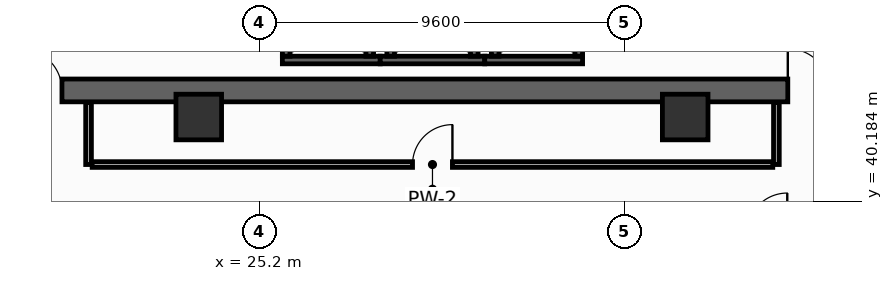
"""IFC4 building model, lengths in metres.
Left out: names, types, materials, properties, quantities, classifications, styles, units other than length and angle.
Written with IfcOpenShell. Run it as: python <this file> out.ifc"""

import sys

from ifc_helpers import new_model, si_unit, direction, frame, frame_2d, origin, origin_2d, place, context, subcontext, project, spatial, rectangle, hollow_rectangle, extrude, element, fill, save


model = new_model("IFC4")
c1 = context("Model", 3, precision=1e-05, world=origin(), true_north=direction((0.0, 1.0)))
c2 = subcontext(c1, "Body", "Model", "MODEL_VIEW")
j1 = project(units=[si_unit("LENGTHUNIT", "METRE"), si_unit("PLANEANGLEUNIT", "RADIAN")], contexts=[c1])
p1 = place(None, origin())
s1 = spatial("IfcSite", under=j1, at=p1, CompositionType="ELEMENT")
p2 = place(p1, origin())
s2 = spatial("IfcBuilding", under=s1, at=p2, CompositionType="ELEMENT")
p3 = place(p2, frame((0.0, 0.0, 60.4)))
s3 = spatial("IfcBuildingStorey", under=s2, at=p3, CompositionType="ELEMENT", Elevation=60.4)
p4 = place(p3, frame((13.5, 43.1, 0.0), z_axis=(0.0, 0.0, 1.0), x_axis=(1.0, 0.0, 0.0)))
e1 = element("IfcWall", 1, at=p4, inside=s3, PredefinedType="SHEAR", context=c2, shape_type="SweptSolid", body=[
    extrude(rectangle(XDim=32.9, YDim=0.6, at=frame_2d((16.45, 0.0))), origin(), (0.0, 0.0, 1.0), 4.15),
])
p5 = place(p4, frame((5.4, 0.0, 0.0)))
e2 = element("IfcOpeningElement", 2, at=p5, cuts=e1, PredefinedType="OPENING", context=c2, shape_type="SweptSolid", body=[
    extrude(rectangle(XDim=1.1, YDim=2.15, at=frame_2d((0.55, 1.075))), frame((0.0, 0.31, 0.0), z_axis=(0.0, -1.0, 0.0), x_axis=(1.0, 0.0, 0.0)), (0.0, 0.0, 1.0), 0.62),
])
p6 = place(p4, frame((25.6, 0.0, 0.0)))
e3 = element("IfcOpeningElement", 3, at=p6, cuts=e1, PredefinedType="OPENING", context=c2, shape_type="SweptSolid", body=[
    extrude(rectangle(XDim=1.1, YDim=2.15, at=frame_2d((0.55, 1.075))), frame((0.0, 0.31, 0.0), z_axis=(0.0, -1.0, 0.0), x_axis=(1.0, 0.0, 0.0)), (0.0, 0.0, 1.0), 0.62),
])
for number, where, z_axis, x_axis in (
    (4, (23.6, 42.4, 0.0), (0.0, 0.0, 1.0), (1.0, 0.0, 0.0)),
    (5, (36.4, 42.4, 0.0), (0.0, 0.0, 1.0), (1.0, 0.0, 0.0)),
):
    element("IfcColumn", number, at=place(p3, frame(where, z_axis=z_axis, x_axis=x_axis)), inside=s3, PredefinedType="COLUMN", context=c2, shape_type="SweptSolid", body=[
        extrude(hollow_rectangle(XDim=1.2, YDim=1.2, WallThickness=0.055, at=origin_2d()), origin(), (0.0, 0.0, 1.0), 4.4),
    ])
p7 = place(p3, frame((25.8, 43.9, 0.0), z_axis=(0.0, 0.0, 1.0), x_axis=(1.0, 0.0, 0.0)))
e6 = element("IfcWall", 6, at=p7, inside=s3, PredefinedType="SHEAR", context=c2, shape_type="SweptSolid", body=[
    extrude(rectangle(XDim=2.575, YDim=0.2, at=frame_2d((1.288, 0.0))), origin(), (0.0, 0.0, 1.0), 4.15),
])
for number, where, z_axis, x_axis in (
    (7, (25.9, 44.0, 0.0), (0.0, 0.0, 1.0), (0.0, 1.0, 0.0)),
    (8, (28.1, 44.0, 0.0), (0.0, 0.0, 1.0), (0.0, 1.0, 0.0)),
):
    element("IfcWall", number, at=place(p3, frame(where, z_axis=z_axis, x_axis=x_axis)), inside=s3, PredefinedType="SHEAR", context=c2, shape_type="SweptSolid", body=[
        extrude(rectangle(XDim=2.3, YDim=0.2, at=frame_2d((1.15, 0.0))), origin(), (0.0, 0.0, 1.0), 4.15),
    ])
p8 = place(p3, frame((28.375, 43.9, 0.0), z_axis=(0.0, 0.0, 1.0), x_axis=(1.0, 0.0, 0.0)))
e9 = element("IfcWall", 9, at=p8, inside=s3, PredefinedType="SHEAR", context=c2, shape_type="SweptSolid", body=[
    extrude(rectangle(XDim=2.75, YDim=0.2, at=frame_2d((1.375, 0.0))), origin(), (0.0, 0.0, 1.0), 4.15),
])
for number, where, z_axis, x_axis in (
    (10, (28.65, 44.0, 0.0), (0.0, 0.0, 1.0), (0.0, 1.0, 0.0)),
    (11, (30.85, 44.0, 0.0), (0.0, 0.0, 1.0), (0.0, 1.0, 0.0)),
):
    element("IfcWall", number, at=place(p3, frame(where, z_axis=z_axis, x_axis=x_axis)), inside=s3, PredefinedType="SHEAR", context=c2, shape_type="SweptSolid", body=[
        extrude(rectangle(XDim=2.3, YDim=0.2, at=frame_2d((1.15, 0.0))), origin(), (0.0, 0.0, 1.0), 4.15),
    ])
p9 = place(p3, frame((31.125, 43.9, 0.0), z_axis=(0.0, 0.0, 1.0), x_axis=(1.0, 0.0, 0.0)))
e12 = element("IfcWall", 12, at=p9, inside=s3, PredefinedType="SHEAR", context=c2, shape_type="SweptSolid", body=[
    extrude(rectangle(XDim=2.575, YDim=0.2, at=frame_2d((1.288, 0.0))), origin(), (0.0, 0.0, 1.0), 4.15),
])
for number, where, z_axis, x_axis in (
    (13, (31.4, 44.0, 0.0), (0.0, 0.0, 1.0), (0.0, 1.0, 0.0)),
    (14, (33.6, 44.0, 0.0), (0.0, 0.0, 1.0), (0.0, 1.0, 0.0)),
):
    element("IfcWall", number, at=place(p3, frame(where, z_axis=z_axis, x_axis=x_axis)), inside=s3, PredefinedType="SHEAR", context=c2, shape_type="SweptSolid", body=[
        extrude(rectangle(XDim=2.3, YDim=0.2, at=frame_2d((1.15, 0.0))), origin(), (0.0, 0.0, 1.0), 4.15),
    ])
for number, where, z_axis, x_axis in (
    (15, (20.7, 41.15, 0.0), (0.0, 0.0, 1.0), (0.0, 1.0, 0.0)),
    (16, (38.8, 41.15, 0.0), (0.0, 0.0, 1.0), (0.0, 1.0, 0.0)),
):
    element("IfcWall", number, at=place(p3, frame(where, z_axis=z_axis, x_axis=x_axis)), inside=s3, PredefinedType="PARTITIONING", context=c2, shape_type="SweptSolid", body=[
        extrude(rectangle(XDim=1.63, YDim=0.15, at=frame_2d((0.815, 0.0))), origin(), (0.0, 0.0, 1.0), 4.15),
    ])
p10 = place(p3, frame((20.795, 41.15, 0.0), z_axis=(0.0, 0.0, 1.0), x_axis=(1.0, 0.0, 0.0)))
e17 = element("IfcWall", 17, at=p10, inside=s3, PredefinedType="PARTITIONING", context=c2, shape_type="SweptSolid", body=[
    extrude(rectangle(XDim=17.91, YDim=0.15, at=frame_2d((8.955, 0.0))), origin(), (0.0, 0.0, 1.0), 3.335),
])
p11 = place(p10, frame((8.43, 0.0, 0.0)))
e18 = element("IfcOpeningElement", 18, at=p11, cuts=e17, PredefinedType="OPENING", context=c2, shape_type="SweptSolid", body=[
    extrude(rectangle(XDim=1.05, YDim=2.15, at=frame_2d((0.525, 1.075))), frame((0.0, 0.085, 0.0), z_axis=(0.0, -1.0, 0.0), x_axis=(1.0, 0.0, 0.0)), (0.0, 0.0, 1.0), 0.17),
])
p12 = place(p5, origin())
e19 = element("IfcDoor", 19, at=p12, inside=s3, OperationType="SINGLE_SWING_LEFT", PredefinedType="DOOR", context=c2, shape_type="SweptSolid", body=[
    extrude(rectangle(XDim=1.1, YDim=2.15, at=frame_2d((0.55, 1.075))), frame((0.0, 0.025, 0.0), z_axis=(0.0, -1.0, 0.0), x_axis=(1.0, 0.0, 0.0)), (0.0, 0.0, 1.0), 0.05),
])
fill(e2, e19)
p13 = place(p6, origin())
e20 = element("IfcDoor", 20, at=p13, inside=s3, OperationType="SINGLE_SWING_LEFT", PredefinedType="DOOR", context=c2, shape_type="SweptSolid", body=[
    extrude(rectangle(XDim=1.1, YDim=2.15, at=frame_2d((0.55, 1.075))), frame((0.0, 0.025, 0.0), z_axis=(0.0, -1.0, 0.0), x_axis=(1.0, 0.0, 0.0)), (0.0, 0.0, 1.0), 0.05),
])
fill(e3, e20)
p14 = place(p11, origin())
e21 = element("IfcDoor", 21, at=p14, inside=s3, OperationType="SINGLE_SWING_RIGHT", PredefinedType="DOOR", context=c2, shape_type="SweptSolid", body=[
    extrude(rectangle(XDim=1.05, YDim=2.15, at=frame_2d((0.525, 1.075))), frame((0.0, 0.025, 0.0), z_axis=(0.0, -1.0, 0.0), x_axis=(1.0, 0.0, 0.0)), (0.0, 0.0, 1.0), 0.05),
])
fill(e18, e21)
save(model, sys.argv[1])
